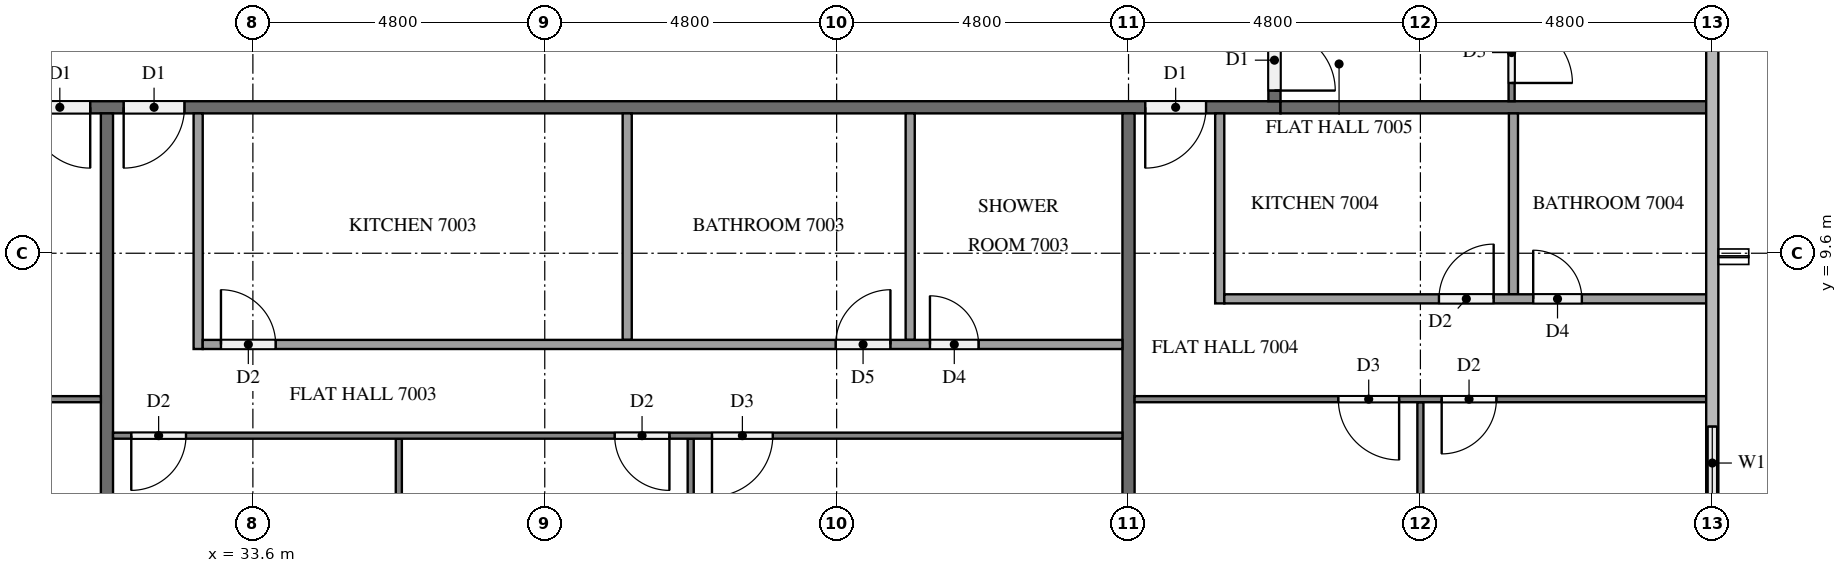
"""IFC4 building model, lengths in metres.
Left out: names, types, materials, properties, quantities, classifications, styles, units other than length and angle.
Written with IfcOpenShell. Run it as: python <this file> out.ifc"""

import sys

from ifc_helpers import new_model, si_unit, direction, frame, frame_2d, origin, place, context, subcontext, project, spatial, rectangle, extrude, element, fill, save


model = new_model("IFC4")
c1 = context("Model", 3, precision=1e-05, world=origin(), true_north=direction((0.0, 1.0)))
c2 = subcontext(c1, "Body", "Model", "MODEL_VIEW")
j1 = project(units=[si_unit("LENGTHUNIT", "METRE"), si_unit("PLANEANGLEUNIT", "RADIAN")], contexts=[c1])
p1 = place(None, origin())
s1 = spatial("IfcSite", under=j1, at=p1, CompositionType="ELEMENT")
p2 = place(p1, origin())
s2 = spatial("IfcBuilding", under=s1, at=p2, CompositionType="ELEMENT")
p3 = place(p2, frame((0.0, 0.0, 268.6)))
s3 = spatial("IfcBuildingStorey", under=s2, at=p3, CompositionType="ELEMENT", Elevation=268.6)
p4 = place(p3, frame((57.6, 5.1, 0.0), z_axis=(0.0, 0.0, 1.0), x_axis=(0.0, 1.0, 0.0)))
e1 = element("IfcWall", 1, at=p4, inside=s3, PredefinedType="SOLIDWALL", context=c2, shape_type="SweptSolid", body=[
    extrude(rectangle(XDim=2.1, YDim=0.15, at=frame_2d((1.05, 0.0))), origin(), (0.0, 0.0, 1.0), 3.2),
])
p5 = place(p4, frame((0.45, 0.0, 0.9)))
e2 = element("IfcOpeningElement", 2, at=p5, cuts=e1, PredefinedType="OPENING", context=c2, shape_type="SweptSolid", body=[
    extrude(rectangle(XDim=1.2, YDim=1.4, at=frame_2d((0.6, 0.7))), frame((0.0, 0.085, 0.0), z_axis=(0.0, -1.0, 0.0), x_axis=(1.0, 0.0, 0.0)), (0.0, 0.0, 1.0), 0.17),
])
p6 = place(p3, frame((50.5, 12.0, 0.0), z_axis=(0.0, 0.0, 1.0), x_axis=(-1.0, 0.0, 0.0)))
e3 = element("IfcWall", 3, at=p6, inside=s3, PredefinedType="PARTITIONING", context=c2, shape_type="SweptSolid", body=[
    extrude(rectangle(XDim=38.6, YDim=0.2, at=frame_2d((19.3, 0.0))), origin(), (0.0, 0.0, 1.0), 3.2),
])
p7 = place(p6, frame((31.525, 0.0, 0.0)))
e4 = element("IfcOpeningElement", 4, at=p7, cuts=e3, PredefinedType="OPENING", context=c2, shape_type="SweptSolid", body=[
    extrude(rectangle(XDim=1.1, YDim=2.1, at=frame_2d((0.55, 1.05))), frame((0.0, 0.11, 0.0), z_axis=(0.0, -1.0, 0.0), x_axis=(1.0, 0.0, 0.0)), (0.0, 0.0, 1.0), 0.22),
])
p8 = place(p6, frame((19.575, 0.0, 0.0)))
e5 = element("IfcOpeningElement", 5, at=p8, cuts=e3, PredefinedType="OPENING", context=c2, shape_type="SweptSolid", body=[
    extrude(rectangle(XDim=1.0, YDim=2.1, at=frame_2d((0.5, 1.05))), frame((0.0, 0.11, 0.0), z_axis=(0.0, -1.0, 0.0), x_axis=(1.0, 0.0, 0.0)), (0.0, 0.0, 1.0), 0.22),
])
p9 = place(p6, frame((18.025, 0.0, 0.0)))
e6 = element("IfcOpeningElement", 6, at=p9, cuts=e3, PredefinedType="OPENING", context=c2, shape_type="SweptSolid", body=[
    extrude(rectangle(XDim=1.0, YDim=2.1, at=frame_2d((0.5, 1.05))), frame((0.0, 0.11, 0.0), z_axis=(0.0, -1.0, 0.0), x_axis=(1.0, 0.0, 0.0)), (0.0, 0.0, 1.0), 0.22),
])
p10 = place(p6, frame((1.225, 0.0, 0.0)))
e7 = element("IfcOpeningElement", 7, at=p10, cuts=e3, PredefinedType="OPENING", context=c2, shape_type="SweptSolid", body=[
    extrude(rectangle(XDim=1.0, YDim=2.1, at=frame_2d((0.5, 1.05))), frame((0.0, 0.11, 0.0), z_axis=(0.0, -1.0, 0.0), x_axis=(1.0, 0.0, 0.0)), (0.0, 0.0, 1.0), 0.22),
])
p11 = place(p3, frame((50.4, 40.7, 0.0), z_axis=(0.0, 0.0, 1.0), x_axis=(0.0, -1.0, 0.0)))
e8 = element("IfcWall", 8, at=p11, inside=s3, PredefinedType="PARTITIONING", context=c2, shape_type="SweptSolid", body=[
    extrude(rectangle(XDim=28.6, YDim=0.2, at=frame_2d((14.3, 0.0))), origin(), (0.0, 0.0, 1.0), 3.2),
])
p12 = place(p11, frame((27.425, 0.0, 0.0)))
e9 = element("IfcOpeningElement", 9, at=p12, cuts=e8, PredefinedType="OPENING", context=c2, shape_type="SweptSolid", body=[
    extrude(rectangle(XDim=1.0, YDim=2.1, at=frame_2d((0.5, 1.05))), frame((0.0, 0.11, 0.0), z_axis=(0.0, -1.0, 0.0), x_axis=(1.0, 0.0, 0.0)), (0.0, 0.0, 1.0), 0.22),
])
p13 = place(p11, frame((0.175, 0.0, 0.0)))
e10 = element("IfcOpeningElement", 10, at=p13, cuts=e8, PredefinedType="OPENING", context=c2, shape_type="SweptSolid", body=[
    extrude(rectangle(XDim=1.0, YDim=2.1, at=frame_2d((0.5, 1.05))), frame((0.0, 0.11, 0.0), z_axis=(0.0, -1.0, 0.0), x_axis=(1.0, 0.0, 0.0)), (0.0, 0.0, 1.0), 0.22),
])
for number, where, z_axis, x_axis in (
    (11, (31.2, 11.9, 0.0), (0.0, 0.0, 1.0), (0.0, -1.0, 0.0)),
    (12, (48.0, 11.9, 0.0), (0.0, 0.0, 1.0), (0.0, -1.0, 0.0)),
):
    element("IfcWall", number, at=place(p3, frame(where, z_axis=z_axis, x_axis=x_axis)), inside=s3, PredefinedType="PARTITIONING", context=c2, shape_type="SweptSolid", body=[
        extrude(rectangle(XDim=11.8, YDim=0.2, at=frame_2d((5.9, 0.0))), origin(), (0.0, 0.0, 1.0), 3.2),
    ])
p14 = place(p3, frame((50.5, 12.0, 0.0), z_axis=(0.0, 0.0, 1.0), x_axis=(1.0, 0.0, 0.0)))
e13 = element("IfcWall", 13, at=p14, inside=s3, PredefinedType="PARTITIONING", context=c2, shape_type="SweptSolid", body=[
    extrude(rectangle(XDim=7.0, YDim=0.2, at=frame_2d((3.5, 0.0))), origin(), (0.0, 0.0, 1.0), 3.2),
])
p15 = place(p3, frame((31.1, 7.2, 0.0), z_axis=(0.0, 0.0, 1.0), x_axis=(-1.0, 0.0, 0.0)))
e14 = element("IfcWall", 14, at=p15, inside=s3, PredefinedType="PARTITIONING", context=c2, shape_type="SweptSolid", body=[
    extrude(rectangle(XDim=11.8, YDim=0.1, at=frame_2d((5.9, 0.0))), origin(), (0.0, 0.0, 1.0), 3.2),
])
p16 = place(p15, frame((3.45, 0.0, 0.0)))
e15 = element("IfcOpeningElement", 15, at=p16, cuts=e14, PredefinedType="OPENING", context=c2, shape_type="SweptSolid", body=[
    extrude(rectangle(XDim=0.9, YDim=2.1, at=frame_2d((0.45, 1.05))), frame((0.0, 0.06, 0.0), z_axis=(0.0, -1.0, 0.0), x_axis=(1.0, 0.0, 0.0)), (0.0, 0.0, 1.0), 0.12),
])
p17 = place(p15, frame((5.05, 0.0, 0.0)))
e16 = element("IfcOpeningElement", 16, at=p17, cuts=e14, PredefinedType="OPENING", context=c2, shape_type="SweptSolid", body=[
    extrude(rectangle(XDim=1.0, YDim=2.1, at=frame_2d((0.5, 1.05))), frame((0.0, 0.06, 0.0), z_axis=(0.0, -1.0, 0.0), x_axis=(1.0, 0.0, 0.0)), (0.0, 0.0, 1.0), 0.12),
])
for number, where, z_axis, x_axis in (
    (17, (36.0, 6.55, 0.0), (0.0, 0.0, 1.0), (0.0, -1.0, 0.0)),
    (18, (40.8, 6.55, 0.0), (0.0, 0.0, 1.0), (0.0, -1.0, 0.0)),
):
    element("IfcWall", number, at=place(p3, frame(where, z_axis=z_axis, x_axis=x_axis)), inside=s3, PredefinedType="PARTITIONING", context=c2, shape_type="SweptSolid", body=[
        extrude(rectangle(XDim=6.45, YDim=0.1, at=frame_2d((3.225, 0.0))), origin(), (0.0, 0.0, 1.0), 3.2),
    ])
p18 = place(p3, frame((47.9, 6.6, 0.0), z_axis=(0.0, 0.0, 1.0), x_axis=(-1.0, 0.0, 0.0)))
e19 = element("IfcWall", 19, at=p18, inside=s3, PredefinedType="PARTITIONING", context=c2, shape_type="SweptSolid", body=[
    extrude(rectangle(XDim=16.6, YDim=0.1, at=frame_2d((8.3, 0.0))), origin(), (0.0, 0.0, 1.0), 3.2),
])
p19 = place(p18, frame((15.4, 0.0, 0.0)))
e20 = element("IfcOpeningElement", 20, at=p19, cuts=e19, PredefinedType="OPENING", context=c2, shape_type="SweptSolid", body=[
    extrude(rectangle(XDim=0.9, YDim=2.1, at=frame_2d((0.45, 1.05))), frame((0.0, 0.06, 0.0), z_axis=(0.0, -1.0, 0.0), x_axis=(1.0, 0.0, 0.0)), (0.0, 0.0, 1.0), 0.12),
])
p20 = place(p18, frame((7.45, 0.0, 0.0)))
e21 = element("IfcOpeningElement", 21, at=p20, cuts=e19, PredefinedType="OPENING", context=c2, shape_type="SweptSolid", body=[
    extrude(rectangle(XDim=0.9, YDim=2.1, at=frame_2d((0.45, 1.05))), frame((0.0, 0.06, 0.0), z_axis=(0.0, -1.0, 0.0), x_axis=(1.0, 0.0, 0.0)), (0.0, 0.0, 1.0), 0.12),
])
p21 = place(p18, frame((5.75, 0.0, 0.0)))
e22 = element("IfcOpeningElement", 22, at=p21, cuts=e19, PredefinedType="OPENING", context=c2, shape_type="SweptSolid", body=[
    extrude(rectangle(XDim=1.0, YDim=2.1, at=frame_2d((0.5, 1.05))), frame((0.0, 0.06, 0.0), z_axis=(0.0, -1.0, 0.0), x_axis=(1.0, 0.0, 0.0)), (0.0, 0.0, 1.0), 0.12),
])
for number, where, z_axis, x_axis in (
    (23, (39.756, 11.9, 0.0), (0.0, 0.0, 1.0), (0.0, -1.0, 0.0)),
    (24, (44.41, 11.9, 0.0), (0.0, 0.0, 1.0), (0.0, -1.0, 0.0)),
):
    element("IfcWall", number, at=place(p3, frame(where, z_axis=z_axis, x_axis=x_axis)), inside=s3, PredefinedType="PARTITIONING", context=c2, shape_type="SweptSolid", body=[
        extrude(rectangle(XDim=3.725, YDim=0.15, at=frame_2d((1.862, 0.0))), origin(), (0.0, 0.0, 1.0), 3.2),
    ])
p22 = place(p3, frame((32.7, 11.9, 0.0), z_axis=(0.0, 0.0, 1.0), x_axis=(0.0, -1.0, 0.0)))
e25 = element("IfcWall", 25, at=p22, inside=s3, PredefinedType="PARTITIONING", context=c2, shape_type="SweptSolid", body=[
    extrude(rectangle(XDim=3.875, YDim=0.15, at=frame_2d((1.938, 0.0))), origin(), (0.0, 0.0, 1.0), 3.2),
])
p23 = place(p3, frame((32.775, 8.1, 0.0), z_axis=(0.0, 0.0, 1.0), x_axis=(1.0, 0.0, 0.0)))
e26 = element("IfcWall", 26, at=p23, inside=s3, PredefinedType="PARTITIONING", context=c2, shape_type="SweptSolid", body=[
    extrude(rectangle(XDim=15.125, YDim=0.15, at=frame_2d((7.562, 0.0))), origin(), (0.0, 0.0, 1.0), 3.2),
])
p24 = place(p23, frame((0.3, 0.0, 0.0)))
e27 = element("IfcOpeningElement", 27, at=p24, cuts=e26, PredefinedType="OPENING", context=c2, shape_type="SweptSolid", body=[
    extrude(rectangle(XDim=0.9, YDim=2.1, at=frame_2d((0.45, 1.05))), frame((0.0, 0.085, 0.0), z_axis=(0.0, -1.0, 0.0), x_axis=(1.0, 0.0, 0.0)), (0.0, 0.0, 1.0), 0.17),
])
p25 = place(p23, frame((10.41, 0.0, 0.0)))
e28 = element("IfcOpeningElement", 28, at=p25, cuts=e26, PredefinedType="OPENING", context=c2, shape_type="SweptSolid", body=[
    extrude(rectangle(XDim=0.9, YDim=2.1, at=frame_2d((0.45, 1.05))), frame((0.0, 0.085, 0.0), z_axis=(0.0, -1.0, 0.0), x_axis=(1.0, 0.0, 0.0)), (0.0, 0.0, 1.0), 0.17),
])
p26 = place(p23, frame((11.96, 0.0, 0.0)))
e29 = element("IfcOpeningElement", 29, at=p26, cuts=e26, PredefinedType="OPENING", context=c2, shape_type="SweptSolid", body=[
    extrude(rectangle(XDim=0.8, YDim=2.1, at=frame_2d((0.4, 1.05))), frame((0.0, 0.085, 0.0), z_axis=(0.0, -1.0, 0.0), x_axis=(1.0, 0.0, 0.0)), (0.0, 0.0, 1.0), 0.17),
])
p27 = place(p3, frame((52.8, 7.15, 0.0), z_axis=(0.0, 0.0, 1.0), x_axis=(0.0, -1.0, 0.0)))
e30 = element("IfcWall", 30, at=p27, inside=s3, PredefinedType="PARTITIONING", context=c2, shape_type="SweptSolid", body=[
    extrude(rectangle(XDim=6.85, YDim=0.1, at=frame_2d((3.425, 0.0))), origin(), (0.0, 0.0, 1.0), 3.2),
])
p28 = place(p3, frame((57.5, 7.2, 0.0), z_axis=(0.0, 0.0, 1.0), x_axis=(-1.0, 0.0, 0.0)))
e31 = element("IfcWall", 31, at=p28, inside=s3, PredefinedType="PARTITIONING", context=c2, shape_type="SweptSolid", body=[
    extrude(rectangle(XDim=9.4, YDim=0.1, at=frame_2d((4.7, 0.0))), origin(), (0.0, 0.0, 1.0), 3.2),
])
p29 = place(p28, frame((5.05, 0.0, 0.0)))
e32 = element("IfcOpeningElement", 32, at=p29, cuts=e31, PredefinedType="OPENING", context=c2, shape_type="SweptSolid", body=[
    extrude(rectangle(XDim=1.0, YDim=2.1, at=frame_2d((0.5, 1.05))), frame((0.0, 0.06, 0.0), z_axis=(0.0, -1.0, 0.0), x_axis=(1.0, 0.0, 0.0)), (0.0, 0.0, 1.0), 0.12),
])
p30 = place(p28, frame((3.45, 0.0, 0.0)))
e33 = element("IfcOpeningElement", 33, at=p30, cuts=e31, PredefinedType="OPENING", context=c2, shape_type="SweptSolid", body=[
    extrude(rectangle(XDim=0.9, YDim=2.1, at=frame_2d((0.45, 1.05))), frame((0.0, 0.06, 0.0), z_axis=(0.0, -1.0, 0.0), x_axis=(1.0, 0.0, 0.0)), (0.0, 0.0, 1.0), 0.12),
])
p31 = place(p3, frame((54.33, 11.9, 0.0), z_axis=(0.0, 0.0, 1.0), x_axis=(0.0, -1.0, 0.0)))
e34 = element("IfcWall", 34, at=p31, inside=s3, PredefinedType="PARTITIONING", context=c2, shape_type="SweptSolid", body=[
    extrude(rectangle(XDim=2.975, YDim=0.15, at=frame_2d((1.487, 0.0))), origin(), (0.0, 0.0, 1.0), 3.2),
])
p32 = place(p3, frame((49.5, 11.9, 0.0), z_axis=(0.0, 0.0, 1.0), x_axis=(0.0, -1.0, 0.0)))
e35 = element("IfcWall", 35, at=p32, inside=s3, PredefinedType="PARTITIONING", context=c2, shape_type="SweptSolid", body=[
    extrude(rectangle(XDim=3.125, YDim=0.15, at=frame_2d((1.562, 0.0))), origin(), (0.0, 0.0, 1.0), 3.2),
])
p33 = place(p3, frame((49.575, 8.85, 0.0), z_axis=(0.0, 0.0, 1.0), x_axis=(1.0, 0.0, 0.0)))
e36 = element("IfcWall", 36, at=p33, inside=s3, PredefinedType="PARTITIONING", context=c2, shape_type="SweptSolid", body=[
    extrude(rectangle(XDim=7.925, YDim=0.15, at=frame_2d((3.962, 0.0))), origin(), (0.0, 0.0, 1.0), 3.2),
])
p34 = place(p33, frame((3.53, 0.0, 0.0)))
e37 = element("IfcOpeningElement", 37, at=p34, cuts=e36, PredefinedType="OPENING", context=c2, shape_type="SweptSolid", body=[
    extrude(rectangle(XDim=0.9, YDim=2.1, at=frame_2d((0.45, 1.05))), frame((0.0, 0.085, 0.0), z_axis=(0.0, -1.0, 0.0), x_axis=(1.0, 0.0, 0.0)), (0.0, 0.0, 1.0), 0.17),
])
p35 = place(p33, frame((5.08, 0.0, 0.0)))
e38 = element("IfcOpeningElement", 38, at=p35, cuts=e36, PredefinedType="OPENING", context=c2, shape_type="SweptSolid", body=[
    extrude(rectangle(XDim=0.8, YDim=2.1, at=frame_2d((0.4, 1.05))), frame((0.0, 0.085, 0.0), z_axis=(0.0, -1.0, 0.0), x_axis=(1.0, 0.0, 0.0)), (0.0, 0.0, 1.0), 0.17),
])
p36 = place(p3, frame((54.3, 28.7, 0.0), z_axis=(0.0, 0.0, 1.0), x_axis=(0.0, -1.0, 0.0)))
e39 = element("IfcWall", 39, at=p36, inside=s3, PredefinedType="PARTITIONING", context=c2, shape_type="SweptSolid", body=[
    extrude(rectangle(XDim=16.6, YDim=0.1, at=frame_2d((8.3, 0.0))), origin(), (0.0, 0.0, 1.0), 3.2),
])
p37 = place(p36, frame((15.3, 0.0, 0.0)))
e40 = element("IfcOpeningElement", 40, at=p37, cuts=e39, PredefinedType="OPENING", context=c2, shape_type="SweptSolid", body=[
    extrude(rectangle(XDim=1.0, YDim=2.1, at=frame_2d((0.5, 1.05))), frame((0.0, 0.06, 0.0), z_axis=(0.0, -1.0, 0.0), x_axis=(1.0, 0.0, 0.0)), (0.0, 0.0, 1.0), 0.12),
])
p38 = place(p36, frame((5.05, 0.0, 0.0)))
e41 = element("IfcOpeningElement", 41, at=p38, cuts=e39, PredefinedType="OPENING", context=c2, shape_type="SweptSolid", body=[
    extrude(rectangle(XDim=0.9, YDim=2.1, at=frame_2d((0.45, 1.05))), frame((0.0, 0.06, 0.0), z_axis=(0.0, -1.0, 0.0), x_axis=(1.0, 0.0, 0.0)), (0.0, 0.0, 1.0), 0.12),
])
p39 = place(p36, frame((3.45, 0.0, 0.0)))
e42 = element("IfcOpeningElement", 42, at=p39, cuts=e39, PredefinedType="OPENING", context=c2, shape_type="SweptSolid", body=[
    extrude(rectangle(XDim=0.9, YDim=2.1, at=frame_2d((0.45, 1.05))), frame((0.0, 0.06, 0.0), z_axis=(0.0, -1.0, 0.0), x_axis=(1.0, 0.0, 0.0)), (0.0, 0.0, 1.0), 0.12),
])
p40 = place(p5, origin())
e43 = element("IfcWindow", 43, at=p40, inside=s3, PartitioningType="SINGLE_PANEL", PredefinedType="WINDOW", context=c2, shape_type="SweptSolid", body=[
    extrude(rectangle(XDim=1.2, YDim=1.4, at=frame_2d((0.6, 0.7))), frame((0.0, 0.03, 0.0), z_axis=(0.0, -1.0, 0.0), x_axis=(1.0, 0.0, 0.0)), (0.0, 0.0, 1.0), 0.06),
])
fill(e2, e43)
p41 = place(p8, origin())
e44 = element("IfcDoor", 44, at=p41, inside=s3, OperationType="SINGLE_SWING_LEFT", PredefinedType="DOOR", context=c2, shape_type="SweptSolid", body=[
    extrude(rectangle(XDim=1.0, YDim=2.1, at=frame_2d((0.5, 1.05))), frame((0.0, 0.025, 0.0), z_axis=(0.0, -1.0, 0.0), x_axis=(1.0, 0.0, 0.0)), (0.0, 0.0, 1.0), 0.05),
])
fill(e5, e44)
p42 = place(p9, origin())
e45 = element("IfcDoor", 45, at=p42, inside=s3, OperationType="SINGLE_SWING_RIGHT", PredefinedType="DOOR", context=c2, shape_type="SweptSolid", body=[
    extrude(rectangle(XDim=1.0, YDim=2.1, at=frame_2d((0.5, 1.05))), frame((0.0, 0.025, 0.0), z_axis=(0.0, -1.0, 0.0), x_axis=(1.0, 0.0, 0.0)), (0.0, 0.0, 1.0), 0.05),
])
fill(e6, e45)
p43 = place(p10, origin())
e46 = element("IfcDoor", 46, at=p43, inside=s3, OperationType="SINGLE_SWING_RIGHT", PredefinedType="DOOR", context=c2, shape_type="SweptSolid", body=[
    extrude(rectangle(XDim=1.0, YDim=2.1, at=frame_2d((0.5, 1.05))), frame((0.0, 0.025, 0.0), z_axis=(0.0, -1.0, 0.0), x_axis=(1.0, 0.0, 0.0)), (0.0, 0.0, 1.0), 0.05),
])
fill(e7, e46)
p44 = place(p12, origin())
e47 = element("IfcDoor", 47, at=p44, inside=s3, OperationType="SINGLE_SWING_RIGHT", PredefinedType="DOOR", context=c2, shape_type="SweptSolid", body=[
    extrude(rectangle(XDim=1.0, YDim=2.1, at=frame_2d((0.5, 1.05))), frame((0.0, 0.025, 0.0), z_axis=(0.0, -1.0, 0.0), x_axis=(1.0, 0.0, 0.0)), (0.0, 0.0, 1.0), 0.05),
])
fill(e9, e47)
p45 = place(p19, origin())
e48 = element("IfcDoor", 48, at=p45, inside=s3, OperationType="SINGLE_SWING_RIGHT", PredefinedType="DOOR", context=c2, shape_type="SweptSolid", body=[
    extrude(rectangle(XDim=0.9, YDim=2.1, at=frame_2d((0.45, 1.05))), frame((0.0, 0.025, 0.0), z_axis=(0.0, -1.0, 0.0), x_axis=(1.0, 0.0, 0.0)), (0.0, 0.0, 1.0), 0.05),
])
fill(e20, e48)
p46 = place(p20, origin())
e49 = element("IfcDoor", 49, at=p46, inside=s3, OperationType="SINGLE_SWING_LEFT", PredefinedType="DOOR", context=c2, shape_type="SweptSolid", body=[
    extrude(rectangle(XDim=0.9, YDim=2.1, at=frame_2d((0.45, 1.05))), frame((0.0, 0.025, 0.0), z_axis=(0.0, -1.0, 0.0), x_axis=(1.0, 0.0, 0.0)), (0.0, 0.0, 1.0), 0.05),
])
fill(e21, e49)
p47 = place(p21, origin())
e50 = element("IfcDoor", 50, at=p47, inside=s3, OperationType="SINGLE_SWING_RIGHT", PredefinedType="DOOR", context=c2, shape_type="SweptSolid", body=[
    extrude(rectangle(XDim=1.0, YDim=2.1, at=frame_2d((0.5, 1.05))), frame((0.0, 0.025, 0.0), z_axis=(0.0, -1.0, 0.0), x_axis=(1.0, 0.0, 0.0)), (0.0, 0.0, 1.0), 0.05),
])
fill(e22, e50)
p48 = place(p24, origin())
e51 = element("IfcDoor", 51, at=p48, inside=s3, OperationType="SINGLE_SWING_LEFT", PredefinedType="DOOR", context=c2, shape_type="SweptSolid", body=[
    extrude(rectangle(XDim=0.9, YDim=2.1, at=frame_2d((0.45, 1.05))), frame((0.0, 0.025, 0.0), z_axis=(0.0, -1.0, 0.0), x_axis=(1.0, 0.0, 0.0)), (0.0, 0.0, 1.0), 0.05),
])
fill(e27, e51)
p49 = place(p25, origin())
e52 = element("IfcDoor", 52, at=p49, inside=s3, OperationType="SINGLE_SWING_RIGHT", PredefinedType="DOOR", context=c2, shape_type="SweptSolid", body=[
    extrude(rectangle(XDim=0.9, YDim=2.1, at=frame_2d((0.45, 1.05))), frame((0.0, 0.025, 0.0), z_axis=(0.0, -1.0, 0.0), x_axis=(1.0, 0.0, 0.0)), (0.0, 0.0, 1.0), 0.05),
])
fill(e28, e52)
p50 = place(p26, origin())
e53 = element("IfcDoor", 53, at=p50, inside=s3, OperationType="SINGLE_SWING_LEFT", PredefinedType="DOOR", context=c2, shape_type="SweptSolid", body=[
    extrude(rectangle(XDim=0.8, YDim=2.1, at=frame_2d((0.4, 1.05))), frame((0.0, 0.025, 0.0), z_axis=(0.0, -1.0, 0.0), x_axis=(1.0, 0.0, 0.0)), (0.0, 0.0, 1.0), 0.05),
])
fill(e29, e53)
p51 = place(p29, origin())
e54 = element("IfcDoor", 54, at=p51, inside=s3, OperationType="SINGLE_SWING_LEFT", PredefinedType="DOOR", context=c2, shape_type="SweptSolid", body=[
    extrude(rectangle(XDim=1.0, YDim=2.1, at=frame_2d((0.5, 1.05))), frame((0.0, 0.025, 0.0), z_axis=(0.0, -1.0, 0.0), x_axis=(1.0, 0.0, 0.0)), (0.0, 0.0, 1.0), 0.05),
])
fill(e32, e54)
p52 = place(p30, origin())
e55 = element("IfcDoor", 55, at=p52, inside=s3, OperationType="SINGLE_SWING_RIGHT", PredefinedType="DOOR", context=c2, shape_type="SweptSolid", body=[
    extrude(rectangle(XDim=0.9, YDim=2.1, at=frame_2d((0.45, 1.05))), frame((0.0, 0.025, 0.0), z_axis=(0.0, -1.0, 0.0), x_axis=(1.0, 0.0, 0.0)), (0.0, 0.0, 1.0), 0.05),
])
fill(e33, e55)
p53 = place(p34, origin())
e56 = element("IfcDoor", 56, at=p53, inside=s3, OperationType="SINGLE_SWING_RIGHT", PredefinedType="DOOR", context=c2, shape_type="SweptSolid", body=[
    extrude(rectangle(XDim=0.9, YDim=2.1, at=frame_2d((0.45, 1.05))), frame((0.0, 0.025, 0.0), z_axis=(0.0, -1.0, 0.0), x_axis=(1.0, 0.0, 0.0)), (0.0, 0.0, 1.0), 0.05),
])
fill(e37, e56)
p54 = place(p35, origin())
e57 = element("IfcDoor", 57, at=p54, inside=s3, OperationType="SINGLE_SWING_LEFT", PredefinedType="DOOR", context=c2, shape_type="SweptSolid", body=[
    extrude(rectangle(XDim=0.8, YDim=2.1, at=frame_2d((0.4, 1.05))), frame((0.0, 0.025, 0.0), z_axis=(0.0, -1.0, 0.0), x_axis=(1.0, 0.0, 0.0)), (0.0, 0.0, 1.0), 0.05),
])
fill(e38, e57)
p55 = place(p37, origin())
e58 = element("IfcDoor", 58, at=p55, inside=s3, OperationType="SINGLE_SWING_RIGHT", PredefinedType="DOOR", context=c2, shape_type="SweptSolid", body=[
    extrude(rectangle(XDim=1.0, YDim=2.1, at=frame_2d((0.5, 1.05))), frame((0.0, 0.025, 0.0), z_axis=(0.0, -1.0, 0.0), x_axis=(1.0, 0.0, 0.0)), (0.0, 0.0, 1.0), 0.05),
])
fill(e40, e58)
save(model, sys.argv[1])
